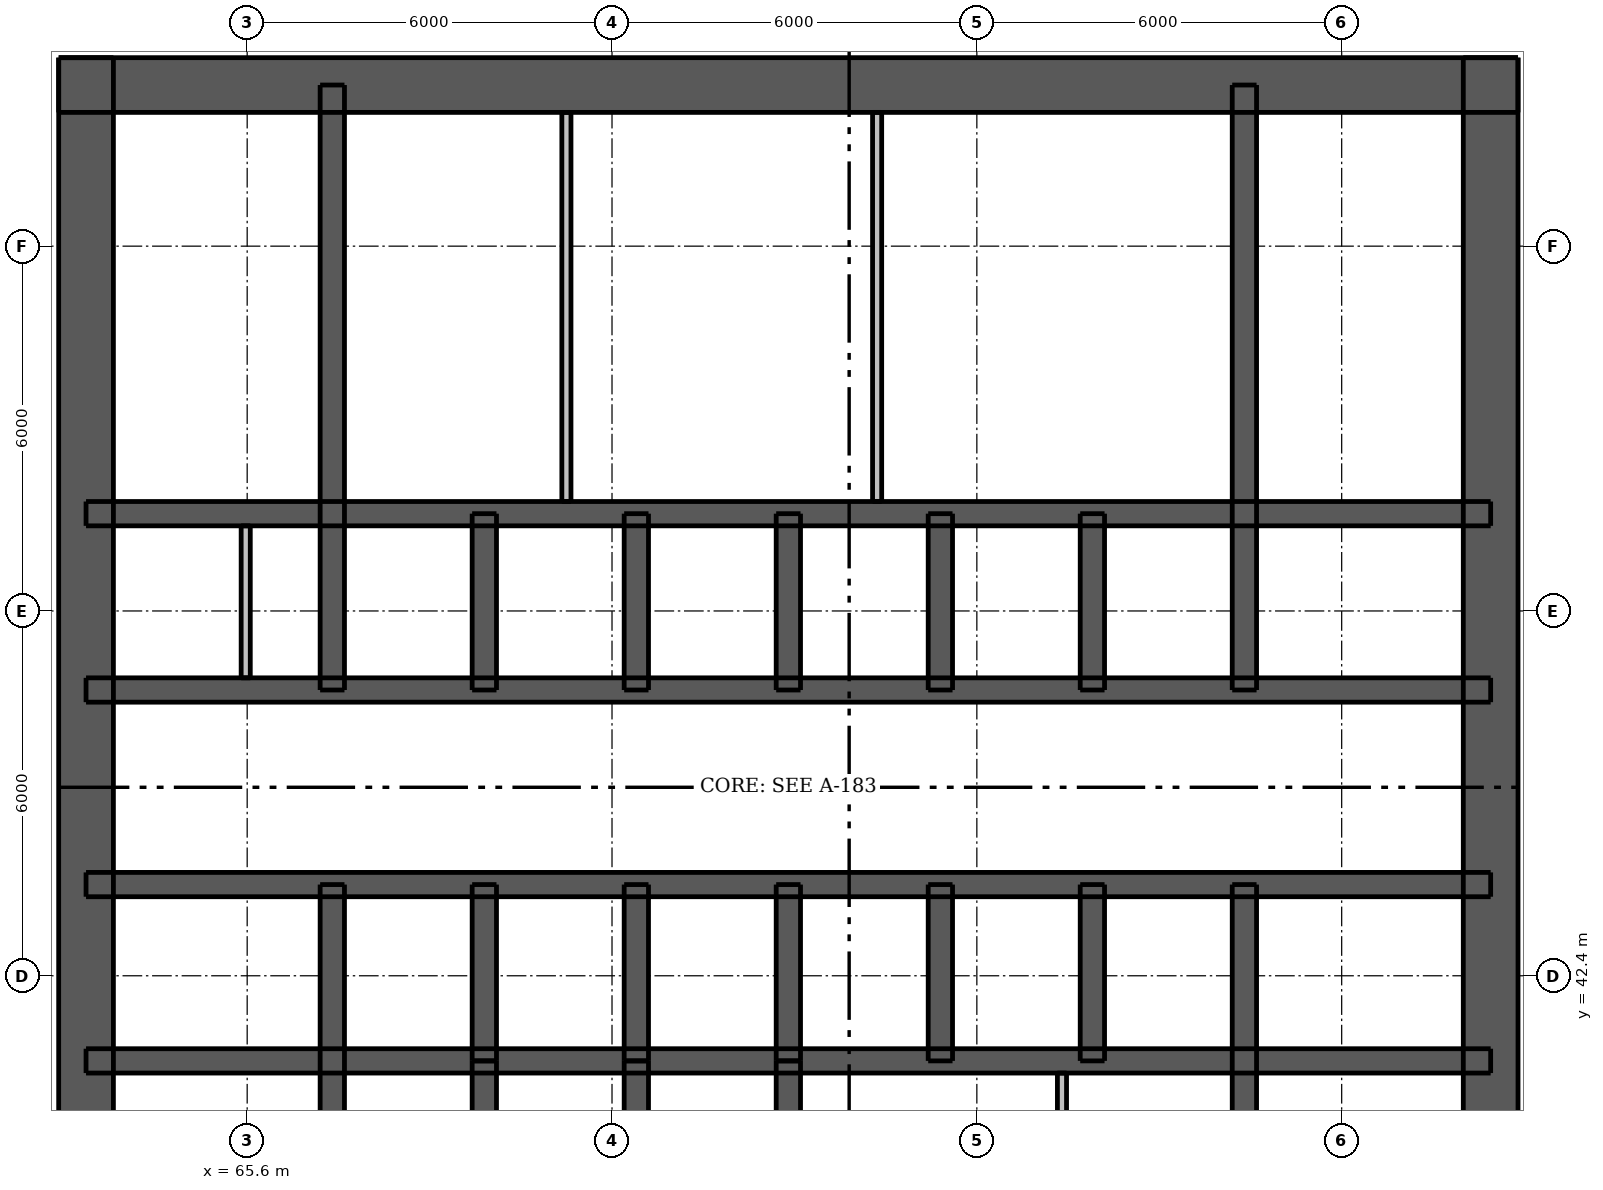
"""IFC4 building model, lengths in metres.
Left out: names, types, materials, properties, quantities, classifications, styles, units other than length and angle.
Written with IfcOpenShell. Run it as: python <this file> out.ifc"""

import sys

from ifc_helpers import new_model, si_unit, direction, frame, frame_2d, origin, place, context, subcontext, project, spatial, rectangle, extrude, element, fill, save


model = new_model("IFC4")
c1 = context("Model", 3, precision=1e-05, world=origin(), true_north=direction((0.0, 1.0)))
c2 = subcontext(c1, "Body", "Model", "MODEL_VIEW")
j1 = project(units=[si_unit("LENGTHUNIT", "METRE"), si_unit("PLANEANGLEUNIT", "RADIAN")], contexts=[c1])
p1 = place(None, origin())
s1 = spatial("IfcSite", under=j1, at=p1, CompositionType="ELEMENT")
p2 = place(p1, origin())
s2 = spatial("IfcBuilding", under=s1, at=p2, CompositionType="ELEMENT")
p3 = place(p2, frame((0.0, 0.0, 14.5)))
s3 = spatial("IfcBuildingStorey", under=s2, at=p3, CompositionType="ELEMENT", Elevation=14.5)
p4 = place(p3, frame((62.5, 57.05, 0.0), z_axis=(0.0, 0.0, 1.0), x_axis=(1.0, 0.0, 0.0)))
e1 = element("IfcWall", 1, at=p4, inside=s3, PredefinedType="SHEAR", context=c2, shape_type="SweptSolid", body=[
    extrude(rectangle(XDim=24.0, YDim=0.9, at=frame_2d((12.0, 0.0))), origin(), (0.0, 0.0, 1.0), 4.2),
])
p5 = place(p4, frame((20.85, 0.0, 0.0)))
e2 = element("IfcOpeningElement", 2, at=p5, cuts=e1, PredefinedType="OPENING", context=c2, shape_type="SweptSolid", body=[
    extrude(rectangle(XDim=1.1, YDim=2.1, at=frame_2d((0.55, 1.05))), frame((0.0, 0.46, 0.0), z_axis=(0.0, -1.0, 0.0), x_axis=(1.0, 0.0, 0.0)), (0.0, 0.0, 1.0), 0.92),
])
p6 = place(p4, frame((2.05, 0.0, 0.0)))
e3 = element("IfcOpeningElement", 3, at=p6, cuts=e1, PredefinedType="OPENING", context=c2, shape_type="SweptSolid", body=[
    extrude(rectangle(XDim=1.1, YDim=2.1, at=frame_2d((0.55, 1.05))), frame((0.0, 0.46, 0.0), z_axis=(0.0, -1.0, 0.0), x_axis=(1.0, 0.0, 0.0)), (0.0, 0.0, 1.0), 0.92),
])
p7 = place(p4, frame((6.075, 0.0, 0.0)))
e4 = element("IfcOpeningElement", 4, at=p7, cuts=e1, PredefinedType="OPENING", context=c2, shape_type="SweptSolid", body=[
    extrude(rectangle(XDim=0.9, YDim=2.1, at=frame_2d((0.45, 1.05))), frame((0.0, 0.46, 0.0), z_axis=(0.0, -1.0, 0.0), x_axis=(1.0, 0.0, 0.0)), (0.0, 0.0, 1.0), 0.92),
])
p8 = place(p4, frame((10.455, 0.0, 0.0)))
e5 = element("IfcOpeningElement", 5, at=p8, cuts=e1, PredefinedType="OPENING", context=c2, shape_type="SweptSolid", body=[
    extrude(rectangle(XDim=0.9, YDim=2.1, at=frame_2d((0.45, 1.05))), frame((0.0, 0.46, 0.0), z_axis=(0.0, -1.0, 0.0), x_axis=(1.0, 0.0, 0.0)), (0.0, 0.0, 1.0), 0.92),
])
p9 = place(p4, frame((15.93, 0.0, 0.0)))
e6 = element("IfcOpeningElement", 6, at=p9, cuts=e1, PredefinedType="OPENING", context=c2, shape_type="SweptSolid", body=[
    extrude(rectangle(XDim=0.9, YDim=2.1, at=frame_2d((0.45, 1.05))), frame((0.0, 0.46, 0.0), z_axis=(0.0, -1.0, 0.0), x_axis=(1.0, 0.0, 0.0)), (0.0, 0.0, 1.0), 0.92),
])
p10 = place(p3, frame((62.95, 33.5, 0.0), z_axis=(0.0, 0.0, 1.0), x_axis=(0.0, 1.0, 0.0)))
e7 = element("IfcWall", 7, at=p10, inside=s3, PredefinedType="SHEAR", context=c2, shape_type="SweptSolid", body=[
    extrude(rectangle(XDim=24.0, YDim=0.9, at=frame_2d((12.0, 0.0))), origin(), (0.0, 0.0, 1.0), 4.2),
])
p11 = place(p10, frame((11.2, 0.0, 0.0)))
e8 = element("IfcOpeningElement", 8, at=p11, cuts=e7, PredefinedType="OPENING", context=c2, shape_type="SweptSolid", body=[
    extrude(rectangle(XDim=1.6, YDim=2.1, at=frame_2d((0.8, 1.05))), frame((0.0, 0.46, 0.0), z_axis=(0.0, -1.0, 0.0), x_axis=(1.0, 0.0, 0.0)), (0.0, 0.0, 1.0), 0.92),
])
p12 = place(p3, frame((86.05, 33.5, 0.0), z_axis=(0.0, 0.0, 1.0), x_axis=(0.0, 1.0, 0.0)))
e9 = element("IfcWall", 9, at=p12, inside=s3, PredefinedType="SHEAR", context=c2, shape_type="SweptSolid", body=[
    extrude(rectangle(XDim=24.0, YDim=0.9, at=frame_2d((12.0, 0.0))), origin(), (0.0, 0.0, 1.0), 4.2),
])
p13 = place(p12, frame((11.2, 0.0, 0.0)))
e10 = element("IfcOpeningElement", 10, at=p13, cuts=e9, PredefinedType="OPENING", context=c2, shape_type="SweptSolid", body=[
    extrude(rectangle(XDim=1.6, YDim=2.1, at=frame_2d((0.8, 1.05))), frame((0.0, 0.46, 0.0), z_axis=(0.0, -1.0, 0.0), x_axis=(1.0, 0.0, 0.0)), (0.0, 0.0, 1.0), 0.92),
])
p14 = place(p3, frame((62.95, 41.0, 0.0), z_axis=(0.0, 0.0, 1.0), x_axis=(1.0, 0.0, 0.0)))
e11 = element("IfcWall", 11, at=p14, inside=s3, PredefinedType="SHEAR", context=c2, shape_type="SweptSolid", body=[
    extrude(rectangle(XDim=23.1, YDim=0.4, at=frame_2d((11.55, 0.0))), origin(), (0.0, 0.0, 1.0), 4.2),
])
p15 = place(p3, frame((62.95, 43.9, 0.0), z_axis=(0.0, 0.0, 1.0), x_axis=(1.0, 0.0, 0.0)))
e12 = element("IfcWall", 12, at=p15, inside=s3, PredefinedType="SHEAR", context=c2, shape_type="SweptSolid", body=[
    extrude(rectangle(XDim=23.1, YDim=0.4, at=frame_2d((11.55, 0.0))), origin(), (0.0, 0.0, 1.0), 4.2),
])
p16 = place(p15, frame((1.7, 0.0, 0.0)))
e13 = element("IfcOpeningElement", 13, at=p16, cuts=e12, PredefinedType="OPENING", context=c2, shape_type="SweptSolid", body=[
    extrude(rectangle(XDim=0.9, YDim=2.1, at=frame_2d((0.45, 1.05))), frame((0.0, 0.21, 0.0), z_axis=(0.0, -1.0, 0.0), x_axis=(1.0, 0.0, 0.0)), (0.0, 0.0, 1.0), 0.42),
])
p17 = place(p15, frame((20.5, 0.0, 0.0)))
e14 = element("IfcOpeningElement", 14, at=p17, cuts=e12, PredefinedType="OPENING", context=c2, shape_type="SweptSolid", body=[
    extrude(rectangle(XDim=0.9, YDim=2.1, at=frame_2d((0.45, 1.05))), frame((0.0, 0.21, 0.0), z_axis=(0.0, -1.0, 0.0), x_axis=(1.0, 0.0, 0.0)), (0.0, 0.0, 1.0), 0.42),
])
p18 = place(p15, frame((4.75, 0.0, 0.0)))
e15 = element("IfcOpeningElement", 15, at=p18, cuts=e12, PredefinedType="OPENING", context=c2, shape_type="SweptSolid", body=[
    extrude(rectangle(XDim=1.1, YDim=2.1, at=frame_2d((0.55, 1.05))), frame((0.0, 0.21, 0.0), z_axis=(0.0, -1.0, 0.0), x_axis=(1.0, 0.0, 0.0)), (0.0, 0.0, 1.0), 0.42),
])
p19 = place(p15, frame((7.25, 0.0, 0.0)))
e16 = element("IfcOpeningElement", 16, at=p19, cuts=e12, PredefinedType="OPENING", context=c2, shape_type="SweptSolid", body=[
    extrude(rectangle(XDim=1.1, YDim=2.1, at=frame_2d((0.55, 1.05))), frame((0.0, 0.21, 0.0), z_axis=(0.0, -1.0, 0.0), x_axis=(1.0, 0.0, 0.0)), (0.0, 0.0, 1.0), 0.42),
])
p20 = place(p15, frame((9.75, 0.0, 0.0)))
e17 = element("IfcOpeningElement", 17, at=p20, cuts=e12, PredefinedType="OPENING", context=c2, shape_type="SweptSolid", body=[
    extrude(rectangle(XDim=1.1, YDim=2.1, at=frame_2d((0.55, 1.05))), frame((0.0, 0.21, 0.0), z_axis=(0.0, -1.0, 0.0), x_axis=(1.0, 0.0, 0.0)), (0.0, 0.0, 1.0), 0.42),
])
p21 = place(p15, frame((12.25, 0.0, 0.0)))
e18 = element("IfcOpeningElement", 18, at=p21, cuts=e12, PredefinedType="OPENING", context=c2, shape_type="SweptSolid", body=[
    extrude(rectangle(XDim=1.1, YDim=2.1, at=frame_2d((0.55, 1.05))), frame((0.0, 0.21, 0.0), z_axis=(0.0, -1.0, 0.0), x_axis=(1.0, 0.0, 0.0)), (0.0, 0.0, 1.0), 0.42),
])
p22 = place(p15, frame((14.75, 0.0, 0.0)))
e19 = element("IfcOpeningElement", 19, at=p22, cuts=e12, PredefinedType="OPENING", context=c2, shape_type="SweptSolid", body=[
    extrude(rectangle(XDim=1.1, YDim=2.1, at=frame_2d((0.55, 1.05))), frame((0.0, 0.21, 0.0), z_axis=(0.0, -1.0, 0.0), x_axis=(1.0, 0.0, 0.0)), (0.0, 0.0, 1.0), 0.42),
])
p23 = place(p15, frame((17.25, 0.0, 0.0)))
e20 = element("IfcOpeningElement", 20, at=p23, cuts=e12, PredefinedType="OPENING", context=c2, shape_type="SweptSolid", body=[
    extrude(rectangle(XDim=1.1, YDim=2.1, at=frame_2d((0.55, 1.05))), frame((0.0, 0.21, 0.0), z_axis=(0.0, -1.0, 0.0), x_axis=(1.0, 0.0, 0.0)), (0.0, 0.0, 1.0), 0.42),
])
p24 = place(p3, frame((62.95, 47.1, 0.0), z_axis=(0.0, 0.0, 1.0), x_axis=(1.0, 0.0, 0.0)))
e21 = element("IfcWall", 21, at=p24, inside=s3, PredefinedType="SHEAR", context=c2, shape_type="SweptSolid", body=[
    extrude(rectangle(XDim=23.1, YDim=0.4, at=frame_2d((11.55, 0.0))), origin(), (0.0, 0.0, 1.0), 4.2),
])
p25 = place(p24, frame((1.088, 0.0, 0.0)))
e22 = element("IfcOpeningElement", 22, at=p25, cuts=e21, PredefinedType="OPENING", context=c2, shape_type="SweptSolid", body=[
    extrude(rectangle(XDim=0.9, YDim=2.1, at=frame_2d((0.45, 1.05))), frame((0.0, 0.21, 0.0), z_axis=(0.0, -1.0, 0.0), x_axis=(1.0, 0.0, 0.0)), (0.0, 0.0, 1.0), 0.42),
])
p26 = place(p24, frame((2.838, 0.0, 0.0)))
e23 = element("IfcOpeningElement", 23, at=p26, cuts=e21, PredefinedType="OPENING", context=c2, shape_type="SweptSolid", body=[
    extrude(rectangle(XDim=0.8, YDim=2.1, at=frame_2d((0.4, 1.05))), frame((0.0, 0.21, 0.0), z_axis=(0.0, -1.0, 0.0), x_axis=(1.0, 0.0, 0.0)), (0.0, 0.0, 1.0), 0.42),
])
p27 = place(p24, frame((20.5, 0.0, 0.0)))
e24 = element("IfcOpeningElement", 24, at=p27, cuts=e21, PredefinedType="OPENING", context=c2, shape_type="SweptSolid", body=[
    extrude(rectangle(XDim=0.9, YDim=2.1, at=frame_2d((0.45, 1.05))), frame((0.0, 0.21, 0.0), z_axis=(0.0, -1.0, 0.0), x_axis=(1.0, 0.0, 0.0)), (0.0, 0.0, 1.0), 0.42),
])
p28 = place(p3, frame((62.95, 50.0, 0.0), z_axis=(0.0, 0.0, 1.0), x_axis=(1.0, 0.0, 0.0)))
e25 = element("IfcWall", 25, at=p28, inside=s3, PredefinedType="SHEAR", context=c2, shape_type="SweptSolid", body=[
    extrude(rectangle(XDim=23.1, YDim=0.4, at=frame_2d((11.55, 0.0))), origin(), (0.0, 0.0, 1.0), 4.2),
])
p29 = place(p3, frame((67.0, 33.95, 0.0), z_axis=(0.0, 0.0, 1.0), x_axis=(0.0, 1.0, 0.0)))
e26 = element("IfcWall", 26, at=p29, inside=s3, PredefinedType="SHEAR", context=c2, shape_type="SweptSolid", body=[
    extrude(rectangle(XDim=9.95, YDim=0.4, at=frame_2d((4.975, 0.0))), origin(), (0.0, 0.0, 1.0), 4.2),
])
p30 = place(p29, frame((0.65, 0.0, 0.0)))
e27 = element("IfcOpeningElement", 27, at=p30, cuts=e26, PredefinedType="OPENING", context=c2, shape_type="SweptSolid", body=[
    extrude(rectangle(XDim=1.1, YDim=2.1, at=frame_2d((0.55, 1.05))), frame((0.0, 0.21, 0.0), z_axis=(0.0, -1.0, 0.0), x_axis=(1.0, 0.0, 0.0)), (0.0, 0.0, 1.0), 0.42),
])
for number, where, z_axis, x_axis in (
    (28, (67.0, 47.1, 0.0), (0.0, 0.0, 1.0), (0.0, 1.0, 0.0)),
    (29, (82.0, 33.95, 0.0), (0.0, 0.0, 1.0), (0.0, 1.0, 0.0)),
    (30, (82.0, 47.1, 0.0), (0.0, 0.0, 1.0), (0.0, 1.0, 0.0)),
):
    element("IfcWall", number, at=place(p3, frame(where, z_axis=z_axis, x_axis=x_axis)), inside=s3, PredefinedType="SHEAR", context=c2, shape_type="SweptSolid", body=[
        extrude(rectangle(XDim=9.95, YDim=0.4, at=frame_2d((4.975, 0.0))), origin(), (0.0, 0.0, 1.0), 4.2),
    ])
for number, where, z_axis, x_axis in (
    (31, (69.5, 41.0, 0.0), (0.0, 0.0, 1.0), (0.0, 1.0, 0.0)),
    (32, (69.5, 47.1, 0.0), (0.0, 0.0, 1.0), (0.0, 1.0, 0.0)),
    (33, (72.0, 41.0, 0.0), (0.0, 0.0, 1.0), (0.0, 1.0, 0.0)),
    (34, (72.0, 47.1, 0.0), (0.0, 0.0, 1.0), (0.0, 1.0, 0.0)),
    (35, (74.5, 41.0, 0.0), (0.0, 0.0, 1.0), (0.0, 1.0, 0.0)),
    (36, (74.5, 47.1, 0.0), (0.0, 0.0, 1.0), (0.0, 1.0, 0.0)),
    (37, (77.0, 41.0, 0.0), (0.0, 0.0, 1.0), (0.0, 1.0, 0.0)),
    (38, (77.0, 47.1, 0.0), (0.0, 0.0, 1.0), (0.0, 1.0, 0.0)),
    (39, (79.5, 41.0, 0.0), (0.0, 0.0, 1.0), (0.0, 1.0, 0.0)),
    (40, (79.5, 47.1, 0.0), (0.0, 0.0, 1.0), (0.0, 1.0, 0.0)),
    (41, (69.5, 38.1, 0.0), (0.0, 0.0, 1.0), (0.0, 1.0, 0.0)),
    (42, (72.0, 38.1, 0.0), (0.0, 0.0, 1.0), (0.0, 1.0, 0.0)),
    (43, (74.5, 38.1, 0.0), (0.0, 0.0, 1.0), (0.0, 1.0, 0.0)),
):
    element("IfcWall", number, at=place(p3, frame(where, z_axis=z_axis, x_axis=x_axis)), inside=s3, PredefinedType="SHEAR", context=c2, shape_type="SweptSolid", body=[
        extrude(rectangle(XDim=2.9, YDim=0.4, at=frame_2d((1.45, 0.0))), origin(), (0.0, 0.0, 1.0), 4.2),
    ])
p31 = place(p3, frame((79.0, 34.4, 0.0), z_axis=(0.0, 0.0, 1.0), x_axis=(0.0, 1.0, 0.0)))
e44 = element("IfcWall", 44, at=p31, inside=s3, PredefinedType="PLUMBINGWALL", context=c2, shape_type="SweptSolid", body=[
    extrude(rectangle(XDim=6.4, YDim=0.15, at=frame_2d((3.2, 0.0))), origin(), (0.0, 0.0, 1.0), 4.2),
])
p32 = place(p3, frame((65.576, 47.3, 0.0), z_axis=(0.0, 0.0, 1.0), x_axis=(0.0, 1.0, 0.0)))
e45 = element("IfcWall", 45, at=p32, inside=s3, PredefinedType="PLUMBINGWALL", context=c2, shape_type="SweptSolid", body=[
    extrude(rectangle(XDim=2.5, YDim=0.15, at=frame_2d((1.25, 0.0))), origin(), (0.0, 0.0, 1.0), 4.2),
])
for number, where, z_axis, x_axis in (
    (46, (70.85, 50.2, 0.0), (0.0, 0.0, 1.0), (0.0, 1.0, 0.0)),
    (47, (75.96, 50.2, 0.0), (0.0, 0.0, 1.0), (0.0, 1.0, 0.0)),
):
    element("IfcWall", number, at=place(p3, frame(where, z_axis=z_axis, x_axis=x_axis)), inside=s3, PredefinedType="PLUMBINGWALL", context=c2, shape_type="SweptSolid", body=[
        extrude(rectangle(XDim=6.4, YDim=0.15, at=frame_2d((3.2, 0.0))), origin(), (0.0, 0.0, 1.0), 4.2),
    ])
p33 = place(p5, origin())
e48 = element("IfcDoor", 48, at=p33, inside=s3, OperationType="SINGLE_SWING_RIGHT", PredefinedType="DOOR", context=c2, shape_type="SweptSolid", body=[
    extrude(rectangle(XDim=1.1, YDim=2.1, at=frame_2d((0.55, 1.05))), frame((0.0, -0.388, 0.0), z_axis=(0.0, -1.0, 0.0), x_axis=(1.0, 0.0, 0.0)), (0.0, 0.0, 1.0), 0.05),
])
fill(e2, e48)
p34 = place(p6, origin())
e49 = element("IfcDoor", 49, at=p34, inside=s3, OperationType="SINGLE_SWING_LEFT", PredefinedType="DOOR", context=c2, shape_type="SweptSolid", body=[
    extrude(rectangle(XDim=1.1, YDim=2.1, at=frame_2d((0.55, 1.05))), frame((0.0, -0.388, 0.0), z_axis=(0.0, -1.0, 0.0), x_axis=(1.0, 0.0, 0.0)), (0.0, 0.0, 1.0), 0.05),
])
fill(e3, e49)
p35 = place(p11, origin())
e50 = element("IfcDoor", 50, at=p35, inside=s3, OperationType="DOUBLE_DOOR_SINGLE_SWING", PredefinedType="DOOR", context=c2, shape_type="SweptSolid", body=[
    extrude(rectangle(XDim=1.6, YDim=2.1, at=frame_2d((0.8, 1.05))), frame((0.0, -0.388, 0.0), z_axis=(0.0, -1.0, 0.0), x_axis=(1.0, 0.0, 0.0)), (0.0, 0.0, 1.0), 0.05),
])
fill(e8, e50)
p36 = place(p13, origin())
e51 = element("IfcDoor", 51, at=p36, inside=s3, OperationType="DOUBLE_DOOR_SINGLE_SWING", PredefinedType="DOOR", context=c2, shape_type="SweptSolid", body=[
    extrude(rectangle(XDim=1.6, YDim=2.1, at=frame_2d((0.8, 1.05))), frame((0.0, 0.438, 0.0), z_axis=(0.0, -1.0, 0.0), x_axis=(1.0, 0.0, 0.0)), (0.0, 0.0, 1.0), 0.05),
])
fill(e10, e51)
p37 = place(p16, origin())
e52 = element("IfcDoor", 52, at=p37, inside=s3, OperationType="SINGLE_SWING_LEFT", PredefinedType="DOOR", context=c2, shape_type="SweptSolid", body=[
    extrude(rectangle(XDim=0.9, YDim=2.1, at=frame_2d((0.45, 1.05))), frame((0.0, -0.138, 0.0), z_axis=(0.0, -1.0, 0.0), x_axis=(1.0, 0.0, 0.0)), (0.0, 0.0, 1.0), 0.05),
])
fill(e13, e52)
p38 = place(p17, origin())
e53 = element("IfcDoor", 53, at=p38, inside=s3, OperationType="SINGLE_SWING_LEFT", PredefinedType="DOOR", context=c2, shape_type="SweptSolid", body=[
    extrude(rectangle(XDim=0.9, YDim=2.1, at=frame_2d((0.45, 1.05))), frame((0.0, -0.138, 0.0), z_axis=(0.0, -1.0, 0.0), x_axis=(1.0, 0.0, 0.0)), (0.0, 0.0, 1.0), 0.05),
])
fill(e14, e53)
p39 = place(p25, origin())
e54 = element("IfcDoor", 54, at=p39, inside=s3, OperationType="SINGLE_SWING_LEFT", PredefinedType="DOOR", context=c2, shape_type="SweptSolid", body=[
    extrude(rectangle(XDim=0.9, YDim=2.1, at=frame_2d((0.45, 1.05))), frame((0.0, 0.188, 0.0), z_axis=(0.0, -1.0, 0.0), x_axis=(1.0, 0.0, 0.0)), (0.0, 0.0, 1.0), 0.05),
])
fill(e22, e54)
p40 = place(p26, origin())
e55 = element("IfcDoor", 55, at=p40, inside=s3, OperationType="SINGLE_SWING_RIGHT", PredefinedType="DOOR", context=c2, shape_type="SweptSolid", body=[
    extrude(rectangle(XDim=0.8, YDim=2.1, at=frame_2d((0.4, 1.05))), frame((0.0, 0.188, 0.0), z_axis=(0.0, -1.0, 0.0), x_axis=(1.0, 0.0, 0.0)), (0.0, 0.0, 1.0), 0.05),
])
fill(e23, e55)
p41 = place(p27, origin())
e56 = element("IfcDoor", 56, at=p41, inside=s3, OperationType="SINGLE_SWING_LEFT", PredefinedType="DOOR", context=c2, shape_type="SweptSolid", body=[
    extrude(rectangle(XDim=0.9, YDim=2.1, at=frame_2d((0.45, 1.05))), frame((0.0, 0.188, 0.0), z_axis=(0.0, -1.0, 0.0), x_axis=(1.0, 0.0, 0.0)), (0.0, 0.0, 1.0), 0.05),
])
fill(e24, e56)
p42 = place(p7, origin())
e57 = element("IfcDoor", 57, at=p42, inside=s3, OperationType="SINGLE_SWING_RIGHT", PredefinedType="DOOR", context=c2, shape_type="SweptSolid", body=[
    extrude(rectangle(XDim=0.9, YDim=2.1, at=frame_2d((0.45, 1.05))), frame((0.0, -0.388, 0.0), z_axis=(0.0, -1.0, 0.0), x_axis=(1.0, 0.0, 0.0)), (0.0, 0.0, 1.0), 0.05),
])
fill(e4, e57)
p43 = place(p8, origin())
e58 = element("IfcDoor", 58, at=p43, inside=s3, OperationType="SINGLE_SWING_RIGHT", PredefinedType="DOOR", context=c2, shape_type="SweptSolid", body=[
    extrude(rectangle(XDim=0.9, YDim=2.1, at=frame_2d((0.45, 1.05))), frame((0.0, -0.388, 0.0), z_axis=(0.0, -1.0, 0.0), x_axis=(1.0, 0.0, 0.0)), (0.0, 0.0, 1.0), 0.05),
])
fill(e5, e58)
p44 = place(p9, origin())
e59 = element("IfcDoor", 59, at=p44, inside=s3, OperationType="SINGLE_SWING_RIGHT", PredefinedType="DOOR", context=c2, shape_type="SweptSolid", body=[
    extrude(rectangle(XDim=0.9, YDim=2.1, at=frame_2d((0.45, 1.05))), frame((0.0, -0.388, 0.0), z_axis=(0.0, -1.0, 0.0), x_axis=(1.0, 0.0, 0.0)), (0.0, 0.0, 1.0), 0.05),
])
fill(e6, e59)
p45 = place(p18, origin())
e60 = element("IfcDoor", 60, at=p45, inside=s3, OperationType="DOUBLE_DOOR_SLIDING", PredefinedType="DOOR", context=c2, shape_type="SweptSolid", body=[
    extrude(rectangle(XDim=1.1, YDim=2.1, at=frame_2d((0.55, 1.05))), frame((0.0, 0.025, 0.0), z_axis=(0.0, -1.0, 0.0), x_axis=(1.0, 0.0, 0.0)), (0.0, 0.0, 1.0), 0.05),
])
fill(e15, e60)
p46 = place(p19, origin())
e61 = element("IfcDoor", 61, at=p46, inside=s3, OperationType="DOUBLE_DOOR_SLIDING", PredefinedType="DOOR", context=c2, shape_type="SweptSolid", body=[
    extrude(rectangle(XDim=1.1, YDim=2.1, at=frame_2d((0.55, 1.05))), frame((0.0, 0.025, 0.0), z_axis=(0.0, -1.0, 0.0), x_axis=(1.0, 0.0, 0.0)), (0.0, 0.0, 1.0), 0.05),
])
fill(e16, e61)
p47 = place(p20, origin())
e62 = element("IfcDoor", 62, at=p47, inside=s3, OperationType="DOUBLE_DOOR_SLIDING", PredefinedType="DOOR", context=c2, shape_type="SweptSolid", body=[
    extrude(rectangle(XDim=1.1, YDim=2.1, at=frame_2d((0.55, 1.05))), frame((0.0, 0.025, 0.0), z_axis=(0.0, -1.0, 0.0), x_axis=(1.0, 0.0, 0.0)), (0.0, 0.0, 1.0), 0.05),
])
fill(e17, e62)
p48 = place(p21, origin())
e63 = element("IfcDoor", 63, at=p48, inside=s3, OperationType="DOUBLE_DOOR_SLIDING", PredefinedType="DOOR", context=c2, shape_type="SweptSolid", body=[
    extrude(rectangle(XDim=1.1, YDim=2.1, at=frame_2d((0.55, 1.05))), frame((0.0, 0.025, 0.0), z_axis=(0.0, -1.0, 0.0), x_axis=(1.0, 0.0, 0.0)), (0.0, 0.0, 1.0), 0.05),
])
fill(e18, e63)
p49 = place(p22, origin())
e64 = element("IfcDoor", 64, at=p49, inside=s3, OperationType="DOUBLE_DOOR_SLIDING", PredefinedType="DOOR", context=c2, shape_type="SweptSolid", body=[
    extrude(rectangle(XDim=1.1, YDim=2.1, at=frame_2d((0.55, 1.05))), frame((0.0, 0.025, 0.0), z_axis=(0.0, -1.0, 0.0), x_axis=(1.0, 0.0, 0.0)), (0.0, 0.0, 1.0), 0.05),
])
fill(e19, e64)
p50 = place(p23, origin())
e65 = element("IfcDoor", 65, at=p50, inside=s3, OperationType="DOUBLE_DOOR_SLIDING", PredefinedType="DOOR", context=c2, shape_type="SweptSolid", body=[
    extrude(rectangle(XDim=1.1, YDim=2.1, at=frame_2d((0.55, 1.05))), frame((0.0, 0.025, 0.0), z_axis=(0.0, -1.0, 0.0), x_axis=(1.0, 0.0, 0.0)), (0.0, 0.0, 1.0), 0.05),
])
fill(e20, e65)
save(model, sys.argv[1])
